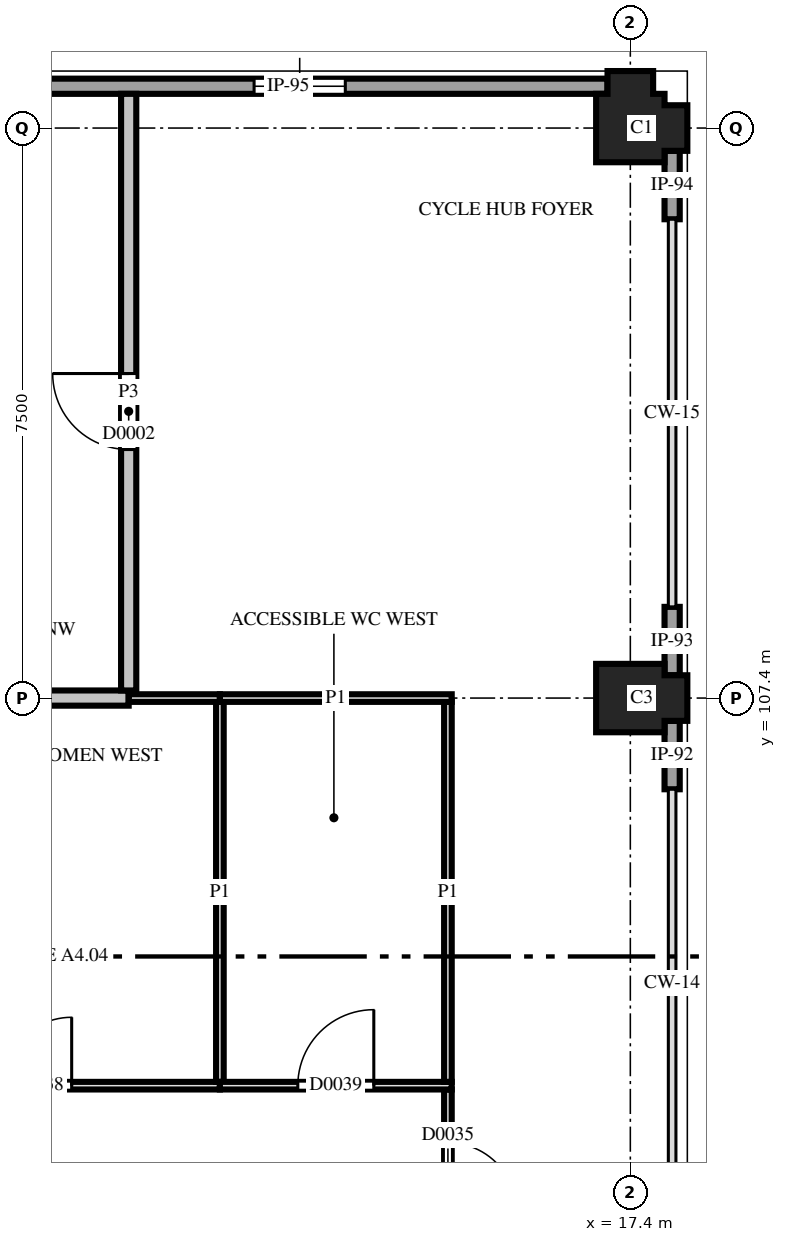
"""IFC4 building model, lengths in metres.
Left out: names, types, materials, properties, quantities, classifications, styles, units other than length and angle.
Written with IfcOpenShell. Run it as: python <this file> out.ifc"""

import sys

from ifc_helpers import new_model, si_unit, direction, frame, frame_2d, origin, place, context, subcontext, project, spatial, polyline, rectangle, outline, extrude, element, fill, save


model = new_model("IFC4")
c1 = context("Model", 3, precision=1e-05, world=origin(), true_north=direction((0.0, 1.0)))
c2 = subcontext(c1, "Body", "Model", "MODEL_VIEW")
j1 = project(units=[si_unit("LENGTHUNIT", "METRE"), si_unit("PLANEANGLEUNIT", "RADIAN")], contexts=[c1])
p1 = place(None, origin())
s1 = spatial("IfcSite", under=j1, at=p1, CompositionType="ELEMENT")
p2 = place(p1, origin())
s2 = spatial("IfcBuilding", under=s1, at=p2, CompositionType="ELEMENT")
p3 = place(p2, origin())
s3 = spatial("IfcBuildingStorey", under=s2, at=p3, CompositionType="ELEMENT", Elevation=0.0)
p4 = place(p3, frame((17.4, 107.4, 0.0), z_axis=(0.0, 0.0, 1.0), x_axis=(1.0, 0.0, 0.0)))
e1 = element("IfcColumn", 1, at=p4, inside=s3, PredefinedType="COLUMN", context=c2, shape_type="SweptSolid", body=[
    extrude(outline(polyline([(-0.45, -0.45), (0.45, -0.45), (0.45, -0.3), (0.75, -0.3), (0.75, 0.3), (0.45, 0.3), (0.45, 0.45), (-0.45, 0.45), (-0.45, -0.45)])), origin(), (0.0, 0.0, 1.0), 4.5),
])
p5 = place(p3, frame((17.4, 114.9, 0.0), z_axis=(0.0, 0.0, 1.0), x_axis=(1.0, 0.0, 0.0)))
e2 = element("IfcColumn", 2, at=p5, inside=s3, PredefinedType="COLUMN", context=c2, shape_type="SweptSolid", body=[
    extrude(outline(polyline([(-0.45, -0.45), (0.45, -0.45), (0.45, -0.3), (0.75, -0.3), (0.75, 0.3), (0.45, 0.3), (0.45, 0.45), (0.3, 0.45), (0.3, 0.75), (-0.3, 0.75), (-0.3, 0.45), (-0.45, 0.45), (-0.45, -0.45)])), origin(), (0.0, 0.0, 1.0), 4.5),
])
for number, where, z_axis, x_axis in (
    (3, (17.95, 106.2, 0.0), (0.0, 0.0, 1.0), (0.0, 1.0, 0.0)),
    (4, (17.95, 107.7, 0.0), (0.0, 0.0, 1.0), (0.0, 1.0, 0.0)),
    (5, (17.95, 113.7, 0.0), (0.0, 0.0, 1.0), (0.0, 1.0, 0.0)),
):
    element("IfcWall", number, at=place(p3, frame(where, z_axis=z_axis, x_axis=x_axis)), inside=s3, PredefinedType="SOLIDWALL", context=c2, shape_type="SweptSolid", body=[
        extrude(rectangle(XDim=0.9, YDim=0.2, at=frame_2d((0.45, 0.0))), origin(), (0.0, 0.0, 1.0), 3.1),
    ])
p6 = place(p3, frame((17.1, 115.45, 0.0), z_axis=(0.0, 0.0, 1.0), x_axis=(-1.0, 0.0, 0.0)))
e6 = element("IfcWall", 6, at=p6, inside=s3, PredefinedType="SOLIDWALL", context=c2, shape_type="SweptSolid", body=[
    extrude(outline(polyline([(0.0, 0.0), (8.4, 0.0), (8.4, 2.5), (7.202, 2.5), (7.2, 2.4), (6.806, 2.412), (6.413, 2.422), (6.019, 2.43), (5.625, 2.438), (5.231, 2.443), (4.837, 2.447), (4.444, 2.449), (4.05, 2.45), (3.656, 2.449), (3.262, 2.447), (2.869, 2.443), (2.475, 2.438), (2.081, 2.43), (1.688, 2.422), (1.294, 2.412), (0.9, 2.4), (0.898, 2.5), (0.0, 2.5), (0.0, 0.0)])), frame((0.0, 0.1, 0.0), z_axis=(0.0, -1.0, 0.0), x_axis=(1.0, 0.0, 0.0)), (0.0, 0.0, 1.0), 0.2),
])
p7 = place(p6, frame((3.45, 0.0, 0.6)))
e7 = element("IfcOpeningElement", 7, at=p7, cuts=e6, PredefinedType="OPENING", context=c2, shape_type="SweptSolid", body=[
    extrude(rectangle(XDim=1.2, YDim=1.2, at=frame_2d((0.6, 0.6))), frame((0.0, 0.11, 0.0), z_axis=(0.0, -1.0, 0.0), x_axis=(1.0, 0.0, 0.0)), (0.0, 0.0, 1.0), 0.22),
])
p8 = place(p3, frame((15.0, 99.95, 0.0), z_axis=(0.0, 0.0, 1.0), x_axis=(0.0, 1.0, 0.0)))
e8 = element("IfcWall", 8, at=p8, inside=s3, PredefinedType="PARTITIONING", context=c2, shape_type="SweptSolid", body=[
    extrude(rectangle(XDim=2.3, YDim=0.1, at=frame_2d((1.15, 0.0))), origin(), (0.0, 0.0, 1.0), 3.68),
])
p9 = place(p8, frame((0.7, 0.0, 0.0)))
e9 = element("IfcOpeningElement", 9, at=p9, cuts=e8, PredefinedType="OPENING", context=c2, shape_type="SweptSolid", body=[
    extrude(rectangle(XDim=0.9, YDim=2.1, at=frame_2d((0.45, 1.05))), frame((0.0, 0.06, 0.0), z_axis=(0.0, -1.0, 0.0), x_axis=(1.0, 0.0, 0.0)), (0.0, 0.0, 1.0), 0.12),
])
p10 = place(p3, frame((12.0, 102.3, 0.0), z_axis=(0.0, 0.0, 1.0), x_axis=(-1.0, 0.0, 0.0)))
e10 = element("IfcWall", 10, at=p10, inside=s3, PredefinedType="PARTITIONING", context=c2, shape_type="SweptSolid", body=[
    extrude(rectangle(XDim=4.8, YDim=0.1, at=frame_2d((2.4, 0.0))), origin(), (0.0, 0.0, 1.0), 3.68),
])
p11 = place(p10, frame((1.95, 0.0, 0.0)))
e11 = element("IfcOpeningElement", 11, at=p11, cuts=e10, PredefinedType="OPENING", context=c2, shape_type="SweptSolid", body=[
    extrude(rectangle(XDim=0.9, YDim=2.1, at=frame_2d((0.45, 1.05))), frame((0.0, 0.06, 0.0), z_axis=(0.0, -1.0, 0.0), x_axis=(1.0, 0.0, 0.0)), (0.0, 0.0, 1.0), 0.12),
])
p12 = place(p3, frame((12.0, 102.35, 0.0), z_axis=(0.0, 0.0, 1.0), x_axis=(0.0, 1.0, 0.0)))
e12 = element("IfcWall", 12, at=p12, inside=s3, PredefinedType="PARTITIONING", context=c2, shape_type="SweptSolid", body=[
    extrude(rectangle(XDim=5.0, YDim=0.1, at=frame_2d((2.5, 0.0))), origin(), (0.0, 0.0, 1.0), 3.68),
])
p13 = place(p3, frame((15.05, 102.3, 0.0), z_axis=(0.0, 0.0, 1.0), x_axis=(-1.0, 0.0, 0.0)))
e13 = element("IfcWall", 13, at=p13, inside=s3, PredefinedType="PARTITIONING", context=c2, shape_type="SweptSolid", body=[
    extrude(rectangle(XDim=3.05, YDim=0.1, at=frame_2d((1.525, 0.0))), origin(), (0.0, 0.0, 1.0), 3.68),
])
p14 = place(p13, frame((1.025, 0.0, 0.0)))
e14 = element("IfcOpeningElement", 14, at=p14, cuts=e13, PredefinedType="OPENING", context=c2, shape_type="SweptSolid", body=[
    extrude(rectangle(XDim=1.0, YDim=2.1, at=frame_2d((0.5, 1.05))), frame((0.0, 0.06, 0.0), z_axis=(0.0, -1.0, 0.0), x_axis=(1.0, 0.0, 0.0)), (0.0, 0.0, 1.0), 0.12),
])
p15 = place(p3, frame((15.0, 102.35, 0.0), z_axis=(0.0, 0.0, 1.0), x_axis=(0.0, 1.0, 0.0)))
e15 = element("IfcWall", 15, at=p15, inside=s3, PredefinedType="PARTITIONING", context=c2, shape_type="SweptSolid", body=[
    extrude(rectangle(XDim=5.0, YDim=0.1, at=frame_2d((2.5, 0.0))), origin(), (0.0, 0.0, 1.0), 3.68),
])
p16 = place(p3, frame((7.2, 107.4, 0.0), z_axis=(0.0, 0.0, 1.0), x_axis=(1.0, 0.0, 0.0)))
e16 = element("IfcWall", 16, at=p16, inside=s3, PredefinedType="PARTITIONING", context=c2, shape_type="SweptSolid", body=[
    extrude(rectangle(XDim=3.6, YDim=0.2, at=frame_2d((1.8, 0.0))), origin(), (0.0, 0.0, 1.0), 3.68),
])
p17 = place(p3, frame((10.8, 107.5, 0.0), z_axis=(0.0, 0.0, 1.0), x_axis=(0.0, 1.0, 0.0)))
e17 = element("IfcWall", 17, at=p17, inside=s3, PredefinedType="PARTITIONING", context=c2, shape_type="SweptSolid", body=[
    extrude(rectangle(XDim=7.85, YDim=0.2, at=frame_2d((3.925, 0.0))), origin(), (0.0, 0.0, 1.0), 3.68),
])
p18 = place(p17, frame((3.17, 0.0, 0.0)))
e18 = element("IfcOpeningElement", 18, at=p18, cuts=e17, PredefinedType="OPENING", context=c2, shape_type="SweptSolid", body=[
    extrude(rectangle(XDim=1.0, YDim=2.1, at=frame_2d((0.5, 1.05))), frame((0.0, 0.11, 0.0), z_axis=(0.0, -1.0, 0.0), x_axis=(1.0, 0.0, 0.0)), (0.0, 0.0, 1.0), 0.22),
])
p19 = place(p3, frame((12.0, 107.4, 0.0), z_axis=(0.0, 0.0, 1.0), x_axis=(-1.0, 0.0, 0.0)))
e19 = element("IfcWall", 19, at=p19, inside=s3, PredefinedType="PARTITIONING", context=c2, shape_type="SweptSolid", body=[
    extrude(rectangle(XDim=1.2, YDim=0.1, at=frame_2d((0.6, 0.0))), origin(), (0.0, 0.0, 1.0), 3.68),
])
p20 = place(p3, frame((15.05, 107.4, 0.0), z_axis=(0.0, 0.0, 1.0), x_axis=(-1.0, 0.0, 0.0)))
e20 = element("IfcWall", 20, at=p20, inside=s3, PredefinedType="PARTITIONING", context=c2, shape_type="SweptSolid", body=[
    extrude(rectangle(XDim=3.05, YDim=0.1, at=frame_2d((1.525, 0.0))), origin(), (0.0, 0.0, 1.0), 3.68),
])
p21 = place(p7, origin())
e21 = element("IfcWindow", 21, at=p21, inside=s3, PartitioningType="SINGLE_PANEL", PredefinedType="WINDOW", context=c2, shape_type="SweptSolid", body=[
    extrude(rectangle(XDim=1.2, YDim=1.2, at=frame_2d((0.6, 0.6))), frame((0.0, 0.03, 0.0), z_axis=(0.0, -1.0, 0.0), x_axis=(1.0, 0.0, 0.0)), (0.0, 0.0, 1.0), 0.06),
])
fill(e7, e21)
p22 = place(p18, origin())
e22 = element("IfcDoor", 22, at=p22, inside=s3, OperationType="SINGLE_SWING_LEFT", PredefinedType="DOOR", context=c2, shape_type="SweptSolid", body=[
    extrude(rectangle(XDim=1.0, YDim=2.1, at=frame_2d((0.5, 1.05))), frame((0.0, 0.025, 0.0), z_axis=(0.0, -1.0, 0.0), x_axis=(1.0, 0.0, 0.0)), (0.0, 0.0, 1.0), 0.05),
])
fill(e18, e22)
p23 = place(p9, origin())
e23 = element("IfcDoor", 23, at=p23, inside=s3, OperationType="SINGLE_SWING_LEFT", PredefinedType="DOOR", context=c2, shape_type="SweptSolid", body=[
    extrude(rectangle(XDim=0.9, YDim=2.1, at=frame_2d((0.45, 1.05))), frame((0.0, 0.025, 0.0), z_axis=(0.0, -1.0, 0.0), x_axis=(1.0, 0.0, 0.0)), (0.0, 0.0, 1.0), 0.05),
])
fill(e9, e23)
p24 = place(p11, origin())
e24 = element("IfcDoor", 24, at=p24, inside=s3, OperationType="SINGLE_SWING_LEFT", PredefinedType="DOOR", context=c2, shape_type="SweptSolid", body=[
    extrude(rectangle(XDim=0.9, YDim=2.1, at=frame_2d((0.45, 1.05))), frame((0.0, 0.025, 0.0), z_axis=(0.0, -1.0, 0.0), x_axis=(1.0, 0.0, 0.0)), (0.0, 0.0, 1.0), 0.05),
])
fill(e11, e24)
p25 = place(p14, origin())
e25 = element("IfcDoor", 25, at=p25, inside=s3, OperationType="SINGLE_SWING_LEFT", PredefinedType="DOOR", context=c2, shape_type="SweptSolid", body=[
    extrude(rectangle(XDim=1.0, YDim=2.1, at=frame_2d((0.5, 1.05))), frame((0.0, 0.025, 0.0), z_axis=(0.0, -1.0, 0.0), x_axis=(1.0, 0.0, 0.0)), (0.0, 0.0, 1.0), 0.05),
])
fill(e14, e25)
save(model, sys.argv[1])
